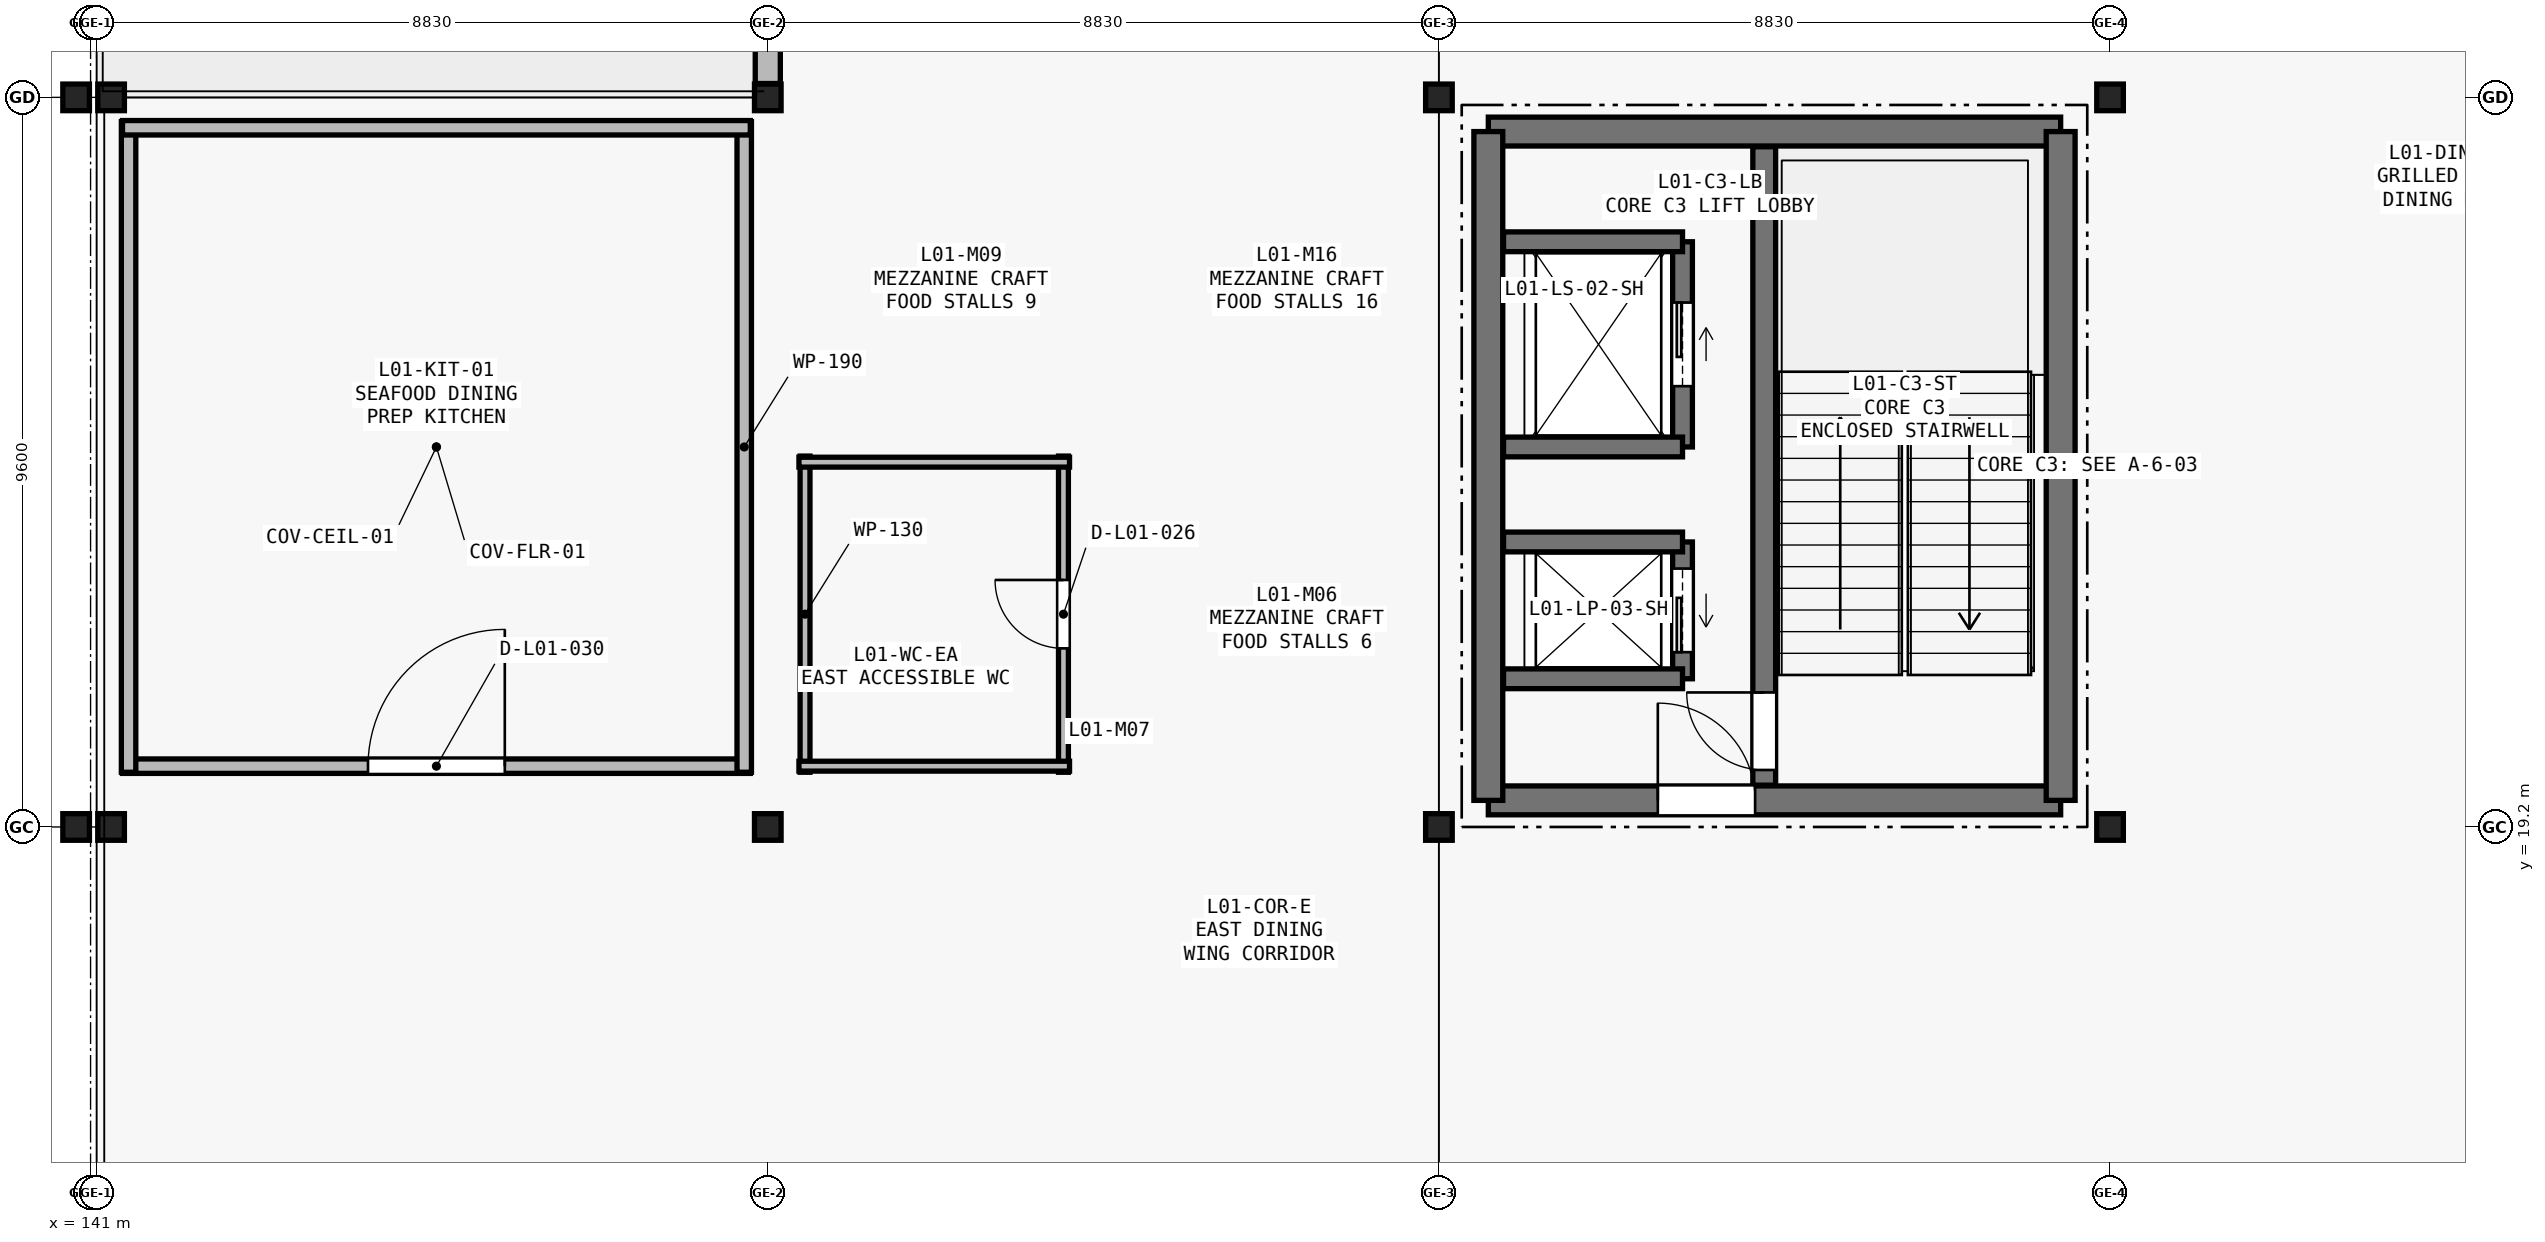
"""IFC4 building model, lengths in metres.
Left out: names, types, materials, properties, quantities, classifications, styles, units other than length and angle.
Written with IfcOpenShell. Run it as: python <this file> out.ifc"""

import sys

from ifc_helpers import new_model, si_unit, direction, frame, frame_2d, origin, origin_2d, place, context, subcontext, project, spatial, rectangle, i_section, extrude, element, fill, save


model = new_model("IFC4")
c1 = context("Model", 3, precision=1e-05, world=origin(), true_north=direction((0.0, 1.0)))
c2 = subcontext(c1, "Body", "Model", "MODEL_VIEW")
j1 = project(units=[si_unit("LENGTHUNIT", "METRE"), si_unit("PLANEANGLEUNIT", "RADIAN")], contexts=[c1])
p1 = place(None, origin())
s1 = spatial("IfcSite", under=j1, at=p1, CompositionType="ELEMENT")
p2 = place(p1, origin())
s2 = spatial("IfcBuilding", under=s1, at=p2, CompositionType="ELEMENT")
p3 = place(p2, frame((0.0, 0.0, 6.0)))
s3 = spatial("IfcBuildingStorey", under=s2, at=p3, CompositionType="ELEMENT", Elevation=6.0)
for number, where, z_axis, x_axis in (
    (1, (140.81, 19.2, 0.0), (0.0, 0.0, 1.0), (1.0, 0.0, 0.0)),
    (2, (140.81, 28.8, 0.0), (0.0, 0.0, 1.0), (1.0, 0.0, 0.0)),
    (3, (141.27, 19.2, 0.0), (0.0, 0.0, 1.0), (1.0, 0.0, 0.0)),
    (4, (141.27, 28.8, 0.0), (0.0, 0.0, 1.0), (1.0, 0.0, 0.0)),
    (5, (149.91, 19.2, 0.0), (0.0, 0.0, 1.0), (1.0, 0.0, 0.0)),
    (6, (149.91, 28.8, 0.0), (0.0, 0.0, 1.0), (1.0, 0.0, 0.0)),
    (7, (158.74, 19.2, 0.0), (0.0, 0.0, 1.0), (1.0, 0.0, 0.0)),
    (8, (158.74, 28.8, 0.0), (0.0, 0.0, 1.0), (1.0, 0.0, 0.0)),
    (9, (167.57, 19.2, 0.0), (0.0, 0.0, 1.0), (1.0, 0.0, 0.0)),
    (10, (167.57, 28.8, 0.0), (0.0, 0.0, 1.0), (1.0, 0.0, 0.0)),
):
    element("IfcColumn", number, at=place(p3, frame(where, z_axis=z_axis, x_axis=x_axis)), inside=s3, PredefinedType="COLUMN", context=c2, shape_type="SweptSolid", body=[
        extrude(i_section(OverallWidth=0.35, OverallDepth=0.35, WebThickness=0.012, FlangeThickness=0.019, FilletRadius=0.02, at=origin_2d()), origin(), (0.0, 0.0, 1.0), 4.8),
    ])
p4 = place(p3, frame((149.91, 28.982, 0.0), z_axis=(0.0, 0.0, 1.0), x_axis=(0.0, 1.0, 0.0)))
e11 = element("IfcWall", 11, at=p4, inside=s3, PredefinedType="SOLIDWALL", context=c2, shape_type="SweptSolid", body=[
    extrude(rectangle(XDim=6.668, YDim=0.33, at=frame_2d((3.334, 0.0))), origin(), (0.0, 0.0, 1.0), 3.95),
])
p5 = place(p4, frame((1.268, 0.0, 0.0)))
e12 = element("IfcOpeningElement", 12, at=p5, cuts=e11, PredefinedType="OPENING", context=c2, shape_type="SweptSolid", body=[
    extrude(rectangle(XDim=1.6, YDim=2.15, at=frame_2d((0.8, 1.075))), frame((0.0, 0.175, 0.0), z_axis=(0.0, -1.0, 0.0), x_axis=(1.0, 0.0, 0.0)), (0.0, 0.0, 1.0), 0.35),
])
p6 = place(p4, frame((3.868, 0.0, 0.0)))
e13 = element("IfcOpeningElement", 13, at=p6, cuts=e11, PredefinedType="OPENING", context=c2, shape_type="SweptSolid", body=[
    extrude(rectangle(XDim=1.6, YDim=2.15, at=frame_2d((0.8, 1.075))), frame((0.0, 0.175, 0.0), z_axis=(0.0, -1.0, 0.0), x_axis=(1.0, 0.0, 0.0)), (0.0, 0.0, 1.0), 0.35),
])
p7 = place(p3, frame((159.39, 19.55, 0.0), z_axis=(0.0, 0.0, 1.0), x_axis=(1.0, 0.0, 0.0)))
e14 = element("IfcWall", 14, at=p7, inside=s3, PredefinedType="SHEAR", context=c2, shape_type="SweptSolid", body=[
    extrude(rectangle(XDim=7.53, YDim=0.38, at=frame_2d((3.765, 0.0))), origin(), (0.0, 0.0, 1.0), 4.8),
])
p8 = place(p7, frame((2.23, 0.0, 0.0)))
e15 = element("IfcOpeningElement", 15, at=p8, cuts=e14, PredefinedType="OPENING", context=c2, shape_type="SweptSolid", body=[
    extrude(rectangle(XDim=1.28, YDim=2.15, at=frame_2d((0.64, 1.075))), frame((0.0, 0.2, 0.0), z_axis=(0.0, -1.0, 0.0), x_axis=(1.0, 0.0, 0.0)), (0.0, 0.0, 1.0), 0.4),
])
p9 = place(p3, frame((166.92, 28.35, 0.0), z_axis=(0.0, 0.0, 1.0), x_axis=(-1.0, 0.0, 0.0)))
e16 = element("IfcWall", 16, at=p9, inside=s3, PredefinedType="SHEAR", context=c2, shape_type="SweptSolid", body=[
    extrude(rectangle(XDim=7.53, YDim=0.38, at=frame_2d((3.765, 0.0))), origin(), (0.0, 0.0, 1.0), 4.8),
])
for number, where, z_axis, x_axis in (
    (17, (159.39, 28.35, 0.0), (0.0, 0.0, 1.0), (0.0, -1.0, 0.0)),
    (18, (166.92, 19.55, 0.0), (0.0, 0.0, 1.0), (0.0, 1.0, 0.0)),
):
    element("IfcWall", number, at=place(p3, frame(where, z_axis=z_axis, x_axis=x_axis)), inside=s3, PredefinedType="SHEAR", context=c2, shape_type="SweptSolid", body=[
        extrude(rectangle(XDim=8.8, YDim=0.38, at=frame_2d((4.4, 0.0))), origin(), (0.0, 0.0, 1.0), 4.8),
    ])
p10 = place(p3, frame((163.02, 19.75, 0.0), z_axis=(0.0, 0.0, 1.0), x_axis=(0.0, 1.0, 0.0)))
e19 = element("IfcWall", 19, at=p10, inside=s3, PredefinedType="SHEAR", context=c2, shape_type="SweptSolid", body=[
    extrude(rectangle(XDim=8.4, YDim=0.3, at=frame_2d((4.2, 0.0))), origin(), (0.0, 0.0, 1.0), 4.8),
])
p11 = place(p10, frame((0.2, 0.0, 0.0)))
e20 = element("IfcOpeningElement", 20, at=p11, cuts=e19, PredefinedType="OPENING", context=c2, shape_type="SweptSolid", body=[
    extrude(rectangle(XDim=1.02, YDim=2.1, at=frame_2d((0.51, 1.05))), frame((0.0, 0.16, 0.0), z_axis=(0.0, -1.0, 0.0), x_axis=(1.0, 0.0, 0.0)), (0.0, 0.0, 1.0), 0.32),
])
p12 = place(p3, frame((161.945, 21.15, 0.0), z_axis=(0.0, 0.0, 1.0), x_axis=(0.0, 1.0, 0.0)))
e21 = element("IfcWall", 21, at=p12, inside=s3, PredefinedType="SHEAR", context=c2, shape_type="SweptSolid", body=[
    extrude(rectangle(XDim=1.8, YDim=0.26, at=frame_2d((0.9, 0.0))), origin(), (0.0, 0.0, 1.0), 4.8),
])
p13 = place(p12, frame((0.35, 0.0, 0.0)))
e22 = element("IfcOpeningElement", 22, at=p13, cuts=e21, PredefinedType="OPENING", context=c2, shape_type="SweptSolid", body=[
    extrude(rectangle(XDim=1.1, YDim=2.15, at=frame_2d((0.55, 1.075))), frame((0.0, 0.14, 0.0), z_axis=(0.0, -1.0, 0.0), x_axis=(1.0, 0.0, 0.0)), (0.0, 0.0, 1.0), 0.28),
])
for number, where, z_axis, x_axis in (
    (23, (159.59, 21.15, 0.0), (0.0, 0.0, 1.0), (1.0, 0.0, 0.0)),
    (24, (159.59, 22.95, 0.0), (0.0, 0.0, 1.0), (1.0, 0.0, 0.0)),
):
    element("IfcWall", number, at=place(p3, frame(where, z_axis=z_axis, x_axis=x_axis)), inside=s3, PredefinedType="SHEAR", context=c2, shape_type="SweptSolid", body=[
        extrude(rectangle(XDim=2.355, YDim=0.26, at=frame_2d((1.177, 0.0))), origin(), (0.0, 0.0, 1.0), 4.8),
    ])
p14 = place(p3, frame((161.945, 24.2, 0.0), z_axis=(0.0, 0.0, 1.0), x_axis=(0.0, 1.0, 0.0)))
e25 = element("IfcWall", 25, at=p14, inside=s3, PredefinedType="SHEAR", context=c2, shape_type="SweptSolid", body=[
    extrude(rectangle(XDim=2.7, YDim=0.26, at=frame_2d((1.35, 0.0))), origin(), (0.0, 0.0, 1.0), 4.8),
])
p15 = place(p14, frame((0.8, 0.0, 0.0)))
e26 = element("IfcOpeningElement", 26, at=p15, cuts=e25, PredefinedType="OPENING", context=c2, shape_type="SweptSolid", body=[
    extrude(rectangle(XDim=1.1, YDim=2.15, at=frame_2d((0.55, 1.075))), frame((0.0, 0.14, 0.0), z_axis=(0.0, -1.0, 0.0), x_axis=(1.0, 0.0, 0.0)), (0.0, 0.0, 1.0), 0.28),
])
for number, where, z_axis, x_axis in (
    (27, (159.59, 24.2, 0.0), (0.0, 0.0, 1.0), (1.0, 0.0, 0.0)),
    (28, (159.59, 26.9, 0.0), (0.0, 0.0, 1.0), (1.0, 0.0, 0.0)),
):
    element("IfcWall", number, at=place(p3, frame(where, z_axis=z_axis, x_axis=x_axis)), inside=s3, PredefinedType="SHEAR", context=c2, shape_type="SweptSolid", body=[
        extrude(rectangle(XDim=2.355, YDim=0.26, at=frame_2d((1.177, 0.0))), origin(), (0.0, 0.0, 1.0), 4.8),
    ])
p16 = place(p3, frame((153.8, 19.92, 0.0), z_axis=(0.0, 0.0, 1.0), x_axis=(0.0, 1.0, 0.0)))
e29 = element("IfcWall", 29, at=p16, inside=s3, PredefinedType="PARTITIONING", context=c2, shape_type="SweptSolid", body=[
    extrude(rectangle(XDim=4.16, YDim=0.13, at=frame_2d((2.08, 0.0))), origin(), (0.0, 0.0, 1.0), 4.32),
])
p17 = place(p16, frame((1.63, 0.0, 0.0)))
e30 = element("IfcOpeningElement", 30, at=p17, cuts=e29, PredefinedType="OPENING", context=c2, shape_type="SweptSolid", body=[
    extrude(rectangle(XDim=0.9, YDim=2.36, at=frame_2d((0.45, 1.18))), frame((0.0, 0.075, 0.0), z_axis=(0.0, -1.0, 0.0), x_axis=(1.0, 0.0, 0.0)), (0.0, 0.0, 1.0), 0.15),
])
p18 = place(p3, frame((150.4, 24.08, 0.0), z_axis=(0.0, 0.0, 1.0), x_axis=(0.0, -1.0, 0.0)))
e31 = element("IfcWall", 31, at=p18, inside=s3, PredefinedType="PARTITIONING", context=c2, shape_type="SweptSolid", body=[
    extrude(rectangle(XDim=4.16, YDim=0.13, at=frame_2d((2.08, 0.0))), origin(), (0.0, 0.0, 1.0), 4.32),
])
for number, where, z_axis, x_axis in (
    (32, (150.32, 20.0, 0.0), (0.0, 0.0, 1.0), (1.0, 0.0, 0.0)),
    (33, (153.88, 24.0, 0.0), (0.0, 0.0, 1.0), (-1.0, 0.0, 0.0)),
):
    element("IfcWall", number, at=place(p3, frame(where, z_axis=z_axis, x_axis=x_axis)), inside=s3, PredefinedType="PARTITIONING", context=c2, shape_type="SweptSolid", body=[
        extrude(rectangle(XDim=3.56, YDim=0.13, at=frame_2d((1.78, 0.0))), origin(), (0.0, 0.0, 1.0), 4.32),
    ])
p19 = place(p3, frame((141.42, 20.0, 0.0), z_axis=(0.0, 0.0, 1.0), x_axis=(1.0, 0.0, 0.0)))
e34 = element("IfcWall", 34, at=p19, inside=s3, PredefinedType="PARTITIONING", context=c2, shape_type="SweptSolid", body=[
    extrude(rectangle(XDim=8.26, YDim=0.19, at=frame_2d((4.13, 0.0))), origin(), (0.0, 0.0, 1.0), 4.32),
])
p20 = place(p19, frame((3.23, 0.0, 0.0)))
e35 = element("IfcOpeningElement", 35, at=p20, cuts=e34, PredefinedType="OPENING", context=c2, shape_type="SweptSolid", body=[
    extrude(rectangle(XDim=1.8, YDim=2.42, at=frame_2d((0.9, 1.21))), frame((0.0, 0.105, 0.0), z_axis=(0.0, -1.0, 0.0), x_axis=(1.0, 0.0, 0.0)), (0.0, 0.0, 1.0), 0.21),
])
p21 = place(p3, frame((149.6, 19.92, 0.0), z_axis=(0.0, 0.0, 1.0), x_axis=(0.0, 1.0, 0.0)))
e36 = element("IfcWall", 36, at=p21, inside=s3, PredefinedType="PARTITIONING", context=c2, shape_type="SweptSolid", body=[
    extrude(rectangle(XDim=8.56, YDim=0.19, at=frame_2d((4.28, 0.0))), origin(), (0.0, 0.0, 1.0), 4.32),
])
p22 = place(p3, frame((141.5, 28.48, 0.0), z_axis=(0.0, 0.0, 1.0), x_axis=(0.0, -1.0, 0.0)))
e37 = element("IfcWall", 37, at=p22, inside=s3, PredefinedType="PARTITIONING", context=c2, shape_type="SweptSolid", body=[
    extrude(rectangle(XDim=8.56, YDim=0.19, at=frame_2d((4.28, 0.0))), origin(), (0.0, 0.0, 1.0), 4.08),
])
p23 = place(p3, frame((149.68, 28.4, 0.0), z_axis=(0.0, 0.0, 1.0), x_axis=(-1.0, 0.0, 0.0)))
e38 = element("IfcWall", 38, at=p23, inside=s3, PredefinedType="PARTITIONING", context=c2, shape_type="SweptSolid", body=[
    extrude(rectangle(XDim=8.26, YDim=0.19, at=frame_2d((4.13, 0.0))), origin(), (0.0, 0.0, 1.0), 4.32),
])
p24 = place(p8, origin())
e39 = element("IfcDoor", 39, at=p24, inside=s3, OperationType="SINGLE_SWING_LEFT", PredefinedType="DOOR", context=c2, shape_type="SweptSolid", body=[
    extrude(rectangle(XDim=1.28, YDim=2.15, at=frame_2d((0.64, 1.075))), frame((0.0, 0.025, 0.0), z_axis=(0.0, -1.0, 0.0), x_axis=(1.0, 0.0, 0.0)), (0.0, 0.0, 1.0), 0.05),
])
fill(e15, e39)
p25 = place(p11, origin())
e40 = element("IfcDoor", 40, at=p25, inside=s3, OperationType="SINGLE_SWING_RIGHT", PredefinedType="DOOR", context=c2, shape_type="SweptSolid", body=[
    extrude(rectangle(XDim=1.02, YDim=2.1, at=frame_2d((0.51, 1.05))), frame((0.0, 0.025, 0.0), z_axis=(0.0, -1.0, 0.0), x_axis=(1.0, 0.0, 0.0)), (0.0, 0.0, 1.0), 0.05),
])
fill(e20, e40)
p26 = place(p13, origin())
e41 = element("IfcDoor", 41, at=p26, inside=s3, OperationType="SLIDING_TO_LEFT", PredefinedType="DOOR", context=c2, shape_type="SweptSolid", body=[
    extrude(rectangle(XDim=1.1, YDim=2.15, at=frame_2d((0.55, 1.075))), frame((0.0, 0.025, 0.0), z_axis=(0.0, -1.0, 0.0), x_axis=(1.0, 0.0, 0.0)), (0.0, 0.0, 1.0), 0.05),
])
fill(e22, e41)
p27 = place(p15, origin())
e42 = element("IfcDoor", 42, at=p27, inside=s3, OperationType="SLIDING_TO_RIGHT", PredefinedType="DOOR", context=c2, shape_type="SweptSolid", body=[
    extrude(rectangle(XDim=1.1, YDim=2.15, at=frame_2d((0.55, 1.075))), frame((0.0, 0.025, 0.0), z_axis=(0.0, -1.0, 0.0), x_axis=(1.0, 0.0, 0.0)), (0.0, 0.0, 1.0), 0.05),
])
fill(e26, e42)
p28 = place(p17, origin())
e43 = element("IfcDoor", 43, at=p28, inside=s3, OperationType="SINGLE_SWING_RIGHT", PredefinedType="DOOR", context=c2, shape_type="SweptSolid", body=[
    extrude(rectangle(XDim=0.9, YDim=2.36, at=frame_2d((0.45, 1.18))), frame((0.0, 0.025, 0.0), z_axis=(0.0, -1.0, 0.0), x_axis=(1.0, 0.0, 0.0)), (0.0, 0.0, 1.0), 0.05),
])
fill(e30, e43)
p29 = place(p20, origin())
e44 = element("IfcDoor", 44, at=p29, inside=s3, OperationType="SINGLE_SWING_RIGHT", PredefinedType="DOOR", context=c2, shape_type="SweptSolid", body=[
    extrude(rectangle(XDim=1.8, YDim=2.42, at=frame_2d((0.9, 1.21))), frame((0.0, 0.025, 0.0), z_axis=(0.0, -1.0, 0.0), x_axis=(1.0, 0.0, 0.0)), (0.0, 0.0, 1.0), 0.05),
])
fill(e35, e44)
save(model, sys.argv[1])
